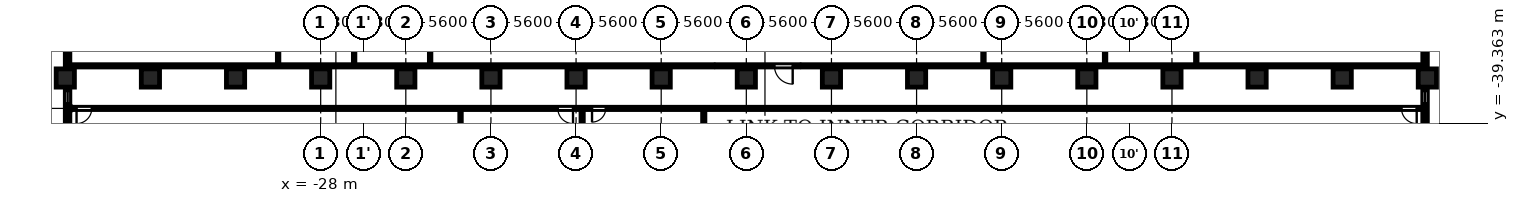
"""IFC4 building model, lengths in metres.
Left out: names, types, materials, properties, quantities, classifications, styles, units other than length and angle.
Written with IfcOpenShell. Run it as: python <this file> out.ifc"""

import sys

from ifc_helpers import new_model, si_unit, direction, frame, frame_2d, origin, origin_2d, place, context, subcontext, project, spatial, rectangle, circle, extrude, element, fill, save


model = new_model("IFC4")
c1 = context("Model", 3, precision=1e-05, world=origin(), true_north=direction((0.0, 1.0)))
c2 = subcontext(c1, "Body", "Model", "MODEL_VIEW")
j1 = project(units=[si_unit("LENGTHUNIT", "METRE"), si_unit("PLANEANGLEUNIT", "RADIAN")], contexts=[c1])
p1 = place(None, origin())
s1 = spatial("IfcSite", under=j1, at=p1, CompositionType="ELEMENT")
p2 = place(p1, origin())
s2 = spatial("IfcBuilding", under=s1, at=p2, CompositionType="ELEMENT")
p3 = place(p2, frame((0.0, 0.0, 11.3)))
s3 = spatial("IfcBuildingStorey", under=s2, at=p3, CompositionType="ELEMENT", Elevation=11.3)
for number, where, z_axis, x_axis in (
    (1, (-44.8, -36.4, 0.0), (0.0, 0.0, 1.0), (1.0, 0.0, 0.0)),
    (2, (-39.2, -36.4, 0.0), (0.0, 0.0, 1.0), (1.0, 0.0, 0.0)),
    (3, (-33.6, -36.4, 0.0), (0.0, 0.0, 1.0), (1.0, 0.0, 0.0)),
    (4, (-28.0, -36.4, 0.0), (0.0, 0.0, 1.0), (1.0, 0.0, 0.0)),
    (5, (-22.4, -36.4, 0.0), (0.0, 0.0, 1.0), (1.0, 0.0, 0.0)),
    (6, (-16.8, -36.4, 0.0), (0.0, 0.0, 1.0), (1.0, 0.0, 0.0)),
    (7, (-11.2, -36.4, 0.0), (0.0, 0.0, 1.0), (1.0, 0.0, 0.0)),
    (8, (-5.6, -36.4, 0.0), (0.0, 0.0, 1.0), (1.0, 0.0, 0.0)),
    (9, (0.0, -36.4, 0.0), (0.0, 0.0, 1.0), (1.0, 0.0, 0.0)),
    (10, (5.6, -36.4, 0.0), (0.0, 0.0, 1.0), (1.0, 0.0, 0.0)),
    (11, (11.2, -36.4, 0.0), (0.0, 0.0, 1.0), (1.0, 0.0, 0.0)),
    (12, (16.8, -36.4, 0.0), (0.0, 0.0, 1.0), (1.0, 0.0, 0.0)),
    (13, (22.4, -36.4, 0.0), (0.0, 0.0, 1.0), (1.0, 0.0, 0.0)),
    (14, (28.0, -36.4, 0.0), (0.0, 0.0, 1.0), (1.0, 0.0, 0.0)),
    (15, (33.6, -36.4, 0.0), (0.0, 0.0, 1.0), (1.0, 0.0, 0.0)),
    (16, (39.2, -36.4, 0.0), (0.0, 0.0, 1.0), (1.0, 0.0, 0.0)),
    (17, (44.8, -36.4, 0.0), (0.0, 0.0, 1.0), (1.0, 0.0, 0.0)),
):
    element("IfcColumn", number, at=place(p3, frame(where, z_axis=z_axis, x_axis=x_axis)), inside=s3, PredefinedType="COLUMN", context=c2, shape_type="SweptSolid", body=[
        extrude(circle(Radius=0.6, at=origin_2d()), origin(), (0.0, 0.0, 1.0), 4.8),
    ])
p4 = place(p3, frame((44.65, -42.8, 0.0), z_axis=(0.0, 0.0, 1.0), x_axis=(0.0, 1.0, 0.0)))
e18 = element("IfcWall", 18, at=p4, inside=s3, PredefinedType="SOLIDWALL", context=c2, shape_type="SweptSolid", body=[
    extrude(rectangle(XDim=5.8, YDim=0.3, at=frame_2d((2.9, 0.0))), origin(), (0.0, 0.0, 1.0), 3.65),
])
p5 = place(p4, frame((1.262, 0.0, 0.9)))
e19 = element("IfcOpeningElement", 19, at=p5, cuts=e18, PredefinedType="OPENING", context=c2, shape_type="SweptSolid", body=[
    extrude(rectangle(XDim=1.8, YDim=1.25, at=frame_2d((0.9, 0.625))), frame((0.0, 0.16, 0.0), z_axis=(0.0, -1.0, 0.0), x_axis=(1.0, 0.0, 0.0)), (0.0, 0.0, 1.0), 0.32),
])
p6 = place(p4, frame((4.738, 0.0, 0.6)))
e20 = element("IfcOpeningElement", 20, at=p6, cuts=e18, PredefinedType="OPENING", context=c2, shape_type="SweptSolid", body=[
    extrude(rectangle(XDim=0.8, YDim=1.55, at=frame_2d((0.4, 0.775))), frame((0.0, 0.16, 0.0), z_axis=(0.0, -1.0, 0.0), x_axis=(1.0, 0.0, 0.0)), (0.0, 0.0, 1.0), 0.32),
])
p7 = place(p3, frame((44.65, -35.8, 0.0), z_axis=(0.0, 0.0, 1.0), x_axis=(0.0, 1.0, 0.0)))
e21 = element("IfcWall", 21, at=p7, inside=s3, PredefinedType="SOLIDWALL", context=c2, shape_type="SweptSolid", body=[
    extrude(rectangle(XDim=5.8, YDim=0.3, at=frame_2d((2.9, 0.0))), origin(), (0.0, 0.0, 1.0), 3.65),
])
p8 = place(p3, frame((-44.65, -30.0, 0.0), z_axis=(0.0, 0.0, 1.0), x_axis=(0.0, -1.0, 0.0)))
e22 = element("IfcWall", 22, at=p8, inside=s3, PredefinedType="SOLIDWALL", context=c2, shape_type="SweptSolid", body=[
    extrude(rectangle(XDim=5.8, YDim=0.3, at=frame_2d((2.9, 0.0))), origin(), (0.0, 0.0, 1.0), 3.65),
])
p9 = place(p8, frame((1.863, 0.0, 0.9)))
e23 = element("IfcOpeningElement", 23, at=p9, cuts=e22, PredefinedType="OPENING", context=c2, shape_type="SweptSolid", body=[
    extrude(rectangle(XDim=1.8, YDim=1.25, at=frame_2d((0.9, 0.625))), frame((0.0, 0.16, 0.0), z_axis=(0.0, -1.0, 0.0), x_axis=(1.0, 0.0, 0.0)), (0.0, 0.0, 1.0), 0.32),
])
p10 = place(p3, frame((-44.65, -37.0, 0.0), z_axis=(0.0, 0.0, 1.0), x_axis=(0.0, -1.0, 0.0)))
e24 = element("IfcWall", 24, at=p10, inside=s3, PredefinedType="SOLIDWALL", context=c2, shape_type="SweptSolid", body=[
    extrude(rectangle(XDim=5.8, YDim=0.3, at=frame_2d((2.9, 0.0))), origin(), (0.0, 0.0, 1.0), 3.65),
])
p11 = place(p10, frame((0.262, 0.0, 0.6)))
e25 = element("IfcOpeningElement", 25, at=p11, cuts=e24, PredefinedType="OPENING", context=c2, shape_type="SweptSolid", body=[
    extrude(rectangle(XDim=0.8, YDim=1.55, at=frame_2d((0.4, 0.775))), frame((0.0, 0.16, 0.0), z_axis=(0.0, -1.0, 0.0), x_axis=(1.0, 0.0, 0.0)), (0.0, 0.0, 1.0), 0.32),
])
p12 = place(p10, frame((3.038, 0.0, 0.6)))
e26 = element("IfcOpeningElement", 26, at=p12, cuts=e24, PredefinedType="OPENING", context=c2, shape_type="SweptSolid", body=[
    extrude(rectangle(XDim=1.2, YDim=1.55, at=frame_2d((0.6, 0.775))), frame((0.0, 0.16, 0.0), z_axis=(0.0, -1.0, 0.0), x_axis=(1.0, 0.0, 0.0)), (0.0, 0.0, 1.0), 0.32),
])
p13 = place(p3, frame((-44.48, -38.4, 0.0), z_axis=(0.0, 0.0, 1.0), x_axis=(1.0, 0.0, 0.0)))
e27 = element("IfcWall", 27, at=p13, inside=s3, PredefinedType="PARTITIONING", context=c2, shape_type="SweptSolid", body=[
    extrude(rectangle(XDim=88.96, YDim=0.15, at=frame_2d((44.48, 0.0))), origin(), (0.0, 0.0, 1.0), 4.45),
])
p14 = place(p13, frame((0.42, 0.0, 0.0)))
e28 = element("IfcOpeningElement", 28, at=p14, cuts=e27, PredefinedType="OPENING", context=c2, shape_type="SweptSolid", body=[
    extrude(rectangle(XDim=1.0, YDim=2.1, at=frame_2d((0.5, 1.05))), frame((0.0, 0.085, 0.0), z_axis=(0.0, -1.0, 0.0), x_axis=(1.0, 0.0, 0.0)), (0.0, 0.0, 1.0), 0.17),
])
p15 = place(p13, frame((32.08, 0.0, 0.0)))
e29 = element("IfcOpeningElement", 29, at=p15, cuts=e27, PredefinedType="OPENING", context=c2, shape_type="SweptSolid", body=[
    extrude(rectangle(XDim=1.0, YDim=2.1, at=frame_2d((0.5, 1.05))), frame((0.0, 0.085, 0.0), z_axis=(0.0, -1.0, 0.0), x_axis=(1.0, 0.0, 0.0)), (0.0, 0.0, 1.0), 0.17),
])
p16 = place(p13, frame((34.33, 0.0, 0.0)))
e30 = element("IfcOpeningElement", 30, at=p16, cuts=e27, PredefinedType="OPENING", context=c2, shape_type="SweptSolid", body=[
    extrude(rectangle(XDim=0.9, YDim=2.1, at=frame_2d((0.45, 1.05))), frame((0.0, 0.085, 0.0), z_axis=(0.0, -1.0, 0.0), x_axis=(1.0, 0.0, 0.0)), (0.0, 0.0, 1.0), 0.17),
])
p17 = place(p13, frame((87.58, 0.0, 0.0)))
e31 = element("IfcOpeningElement", 31, at=p17, cuts=e27, PredefinedType="OPENING", context=c2, shape_type="SweptSolid", body=[
    extrude(rectangle(XDim=1.0, YDim=2.1, at=frame_2d((0.5, 1.05))), frame((0.0, 0.085, 0.0), z_axis=(0.0, -1.0, 0.0), x_axis=(1.0, 0.0, 0.0)), (0.0, 0.0, 1.0), 0.17),
])
p18 = place(p3, frame((-44.48, -35.6, 0.0), z_axis=(0.0, 0.0, 1.0), x_axis=(1.0, 0.0, 0.0)))
e32 = element("IfcWall", 32, at=p18, inside=s3, PredefinedType="PARTITIONING", context=c2, shape_type="SweptSolid", body=[
    extrude(rectangle(XDim=42.38, YDim=0.15, at=frame_2d((21.19, 0.0))), origin(), (0.0, 0.0, 1.0), 4.45),
])
p19 = place(p3, frame((-2.05, -35.6, 0.0), z_axis=(0.0, 0.0, 1.0), x_axis=(1.0, 0.0, 0.0)))
e33 = element("IfcWall", 33, at=p19, inside=s3, PredefinedType="PARTITIONING", context=c2, shape_type="SweptSolid", body=[
    extrude(rectangle(XDim=5.6, YDim=0.15, at=frame_2d((2.8, 0.0))), origin(), (0.0, 0.0, 1.0), 4.45),
])
p20 = place(p19, frame((3.9, 0.0, 0.0)))
e34 = element("IfcOpeningElement", 34, at=p20, cuts=e33, PredefinedType="OPENING", context=c2, shape_type="SweptSolid", body=[
    extrude(rectangle(XDim=1.2, YDim=2.1, at=frame_2d((0.6, 1.05))), frame((0.0, 0.085, 0.0), z_axis=(0.0, -1.0, 0.0), x_axis=(1.0, 0.0, 0.0)), (0.0, 0.0, 1.0), 0.17),
])
p21 = place(p3, frame((3.6, -35.6, 0.0), z_axis=(0.0, 0.0, 1.0), x_axis=(1.0, 0.0, 0.0)))
e35 = element("IfcWall", 35, at=p21, inside=s3, PredefinedType="PARTITIONING", context=c2, shape_type="SweptSolid", body=[
    extrude(rectangle(XDim=40.88, YDim=0.15, at=frame_2d((20.44, 0.0))), origin(), (0.0, 0.0, 1.0), 4.45),
])
for number, where, z_axis, x_axis in (
    (36, (-30.8, -35.525, 0.0), (0.0, 0.0, 1.0), (0.0, 1.0, 0.0)),
    (37, (-25.8, -35.525, 0.0), (0.0, 0.0, 1.0), (0.0, 1.0, 0.0)),
    (38, (-20.8, -35.525, 0.0), (0.0, 0.0, 1.0), (0.0, 1.0, 0.0)),
):
    element("IfcWall", number, at=place(p3, frame(where, z_axis=z_axis, x_axis=x_axis)), inside=s3, PredefinedType="PARTITIONING", context=c2, shape_type="SweptSolid", body=[
        extrude(rectangle(XDim=10.65, YDim=0.1, at=frame_2d((5.325, 0.0))), origin(), (0.0, 0.0, 1.0), 4.45),
    ])
p22 = place(p3, frame((-18.8, -50.08, 0.0), z_axis=(0.0, 0.0, 1.0), x_axis=(0.0, 1.0, 0.0)))
e39 = element("IfcWall", 39, at=p22, inside=s3, PredefinedType="PARTITIONING", context=c2, shape_type="SweptSolid", body=[
    extrude(rectangle(XDim=11.605, YDim=0.1, at=frame_2d((5.802, 0.0))), origin(), (0.0, 0.0, 1.0), 4.45),
])
p23 = place(p3, frame((-10.8, -51.23, 0.0), z_axis=(0.0, 0.0, 1.0), x_axis=(0.0, 1.0, 0.0)))
e40 = element("IfcWall", 40, at=p23, inside=s3, PredefinedType="PARTITIONING", context=c2, shape_type="SweptSolid", body=[
    extrude(rectangle(XDim=12.755, YDim=0.15, at=frame_2d((6.377, 0.0))), origin(), (0.0, 0.0, 1.0), 4.45),
])
p24 = place(p3, frame((-2.8, -50.08, 0.0), z_axis=(0.0, 0.0, 1.0), x_axis=(0.0, 1.0, 0.0)))
e41 = element("IfcWall", 41, at=p24, inside=s3, PredefinedType="PARTITIONING", context=c2, shape_type="SweptSolid", body=[
    extrude(rectangle(XDim=11.605, YDim=0.15, at=frame_2d((5.802, 0.0))), origin(), (0.0, 0.0, 1.0), 4.45),
])
for number, where, z_axis, x_axis in (
    (42, (15.6, -35.525, 0.0), (0.0, 0.0, 1.0), (0.0, 1.0, 0.0)),
    (43, (23.6, -35.525, 0.0), (0.0, 0.0, 1.0), (0.0, 1.0, 0.0)),
    (44, (29.6, -35.525, 0.0), (0.0, 0.0, 1.0), (0.0, 1.0, 0.0)),
):
    element("IfcWall", number, at=place(p3, frame(where, z_axis=z_axis, x_axis=x_axis)), inside=s3, PredefinedType="PARTITIONING", context=c2, shape_type="SweptSolid", body=[
        extrude(rectangle(XDim=10.65, YDim=0.1, at=frame_2d((5.325, 0.0))), origin(), (0.0, 0.0, 1.0), 4.45),
    ])
p25 = place(p20, origin())
e45 = element("IfcDoor", 45, at=p25, inside=s3, OperationType="SINGLE_SWING_RIGHT", PredefinedType="DOOR", context=c2, shape_type="SweptSolid", body=[
    extrude(rectangle(XDim=1.2, YDim=2.1, at=frame_2d((0.6, 1.05))), frame((0.0, 0.025, 0.0), z_axis=(0.0, -1.0, 0.0), x_axis=(1.0, 0.0, 0.0)), (0.0, 0.0, 1.0), 0.05),
])
fill(e34, e45)
p26 = place(p14, origin())
e46 = element("IfcDoor", 46, at=p26, inside=s3, OperationType="SINGLE_SWING_LEFT", PredefinedType="DOOR", context=c2, shape_type="SweptSolid", body=[
    extrude(rectangle(XDim=1.0, YDim=2.1, at=frame_2d((0.5, 1.05))), frame((0.0, 0.025, 0.0), z_axis=(0.0, -1.0, 0.0), x_axis=(1.0, 0.0, 0.0)), (0.0, 0.0, 1.0), 0.05),
])
fill(e28, e46)
p27 = place(p15, origin())
e47 = element("IfcDoor", 47, at=p27, inside=s3, OperationType="SINGLE_SWING_RIGHT", PredefinedType="DOOR", context=c2, shape_type="SweptSolid", body=[
    extrude(rectangle(XDim=1.0, YDim=2.1, at=frame_2d((0.5, 1.05))), frame((0.0, 0.025, 0.0), z_axis=(0.0, -1.0, 0.0), x_axis=(1.0, 0.0, 0.0)), (0.0, 0.0, 1.0), 0.05),
])
fill(e29, e47)
p28 = place(p16, origin())
e48 = element("IfcDoor", 48, at=p28, inside=s3, OperationType="SINGLE_SWING_LEFT", PredefinedType="DOOR", context=c2, shape_type="SweptSolid", body=[
    extrude(rectangle(XDim=0.9, YDim=2.1, at=frame_2d((0.45, 1.05))), frame((0.0, 0.025, 0.0), z_axis=(0.0, -1.0, 0.0), x_axis=(1.0, 0.0, 0.0)), (0.0, 0.0, 1.0), 0.05),
])
fill(e30, e48)
p29 = place(p17, origin())
e49 = element("IfcDoor", 49, at=p29, inside=s3, OperationType="SINGLE_SWING_RIGHT", PredefinedType="DOOR", context=c2, shape_type="SweptSolid", body=[
    extrude(rectangle(XDim=1.0, YDim=2.1, at=frame_2d((0.5, 1.05))), frame((0.0, 0.025, 0.0), z_axis=(0.0, -1.0, 0.0), x_axis=(1.0, 0.0, 0.0)), (0.0, 0.0, 1.0), 0.05),
])
fill(e31, e49)
p30 = place(p6, origin())
e50 = element("IfcWindow", 50, at=p30, inside=s3, PartitioningType="SINGLE_PANEL", PredefinedType="WINDOW", context=c2, shape_type="SweptSolid", body=[
    extrude(rectangle(XDim=0.8, YDim=1.55, at=frame_2d((0.4, 0.775))), frame((0.0, 0.03, 0.0), z_axis=(0.0, -1.0, 0.0), x_axis=(1.0, 0.0, 0.0)), (0.0, 0.0, 1.0), 0.06),
])
fill(e20, e50)
p31 = place(p11, origin())
e51 = element("IfcWindow", 51, at=p31, inside=s3, PartitioningType="SINGLE_PANEL", PredefinedType="WINDOW", context=c2, shape_type="SweptSolid", body=[
    extrude(rectangle(XDim=0.8, YDim=1.55, at=frame_2d((0.4, 0.775))), frame((0.0, 0.03, 0.0), z_axis=(0.0, -1.0, 0.0), x_axis=(1.0, 0.0, 0.0)), (0.0, 0.0, 1.0), 0.06),
])
fill(e25, e51)
save(model, sys.argv[1])
